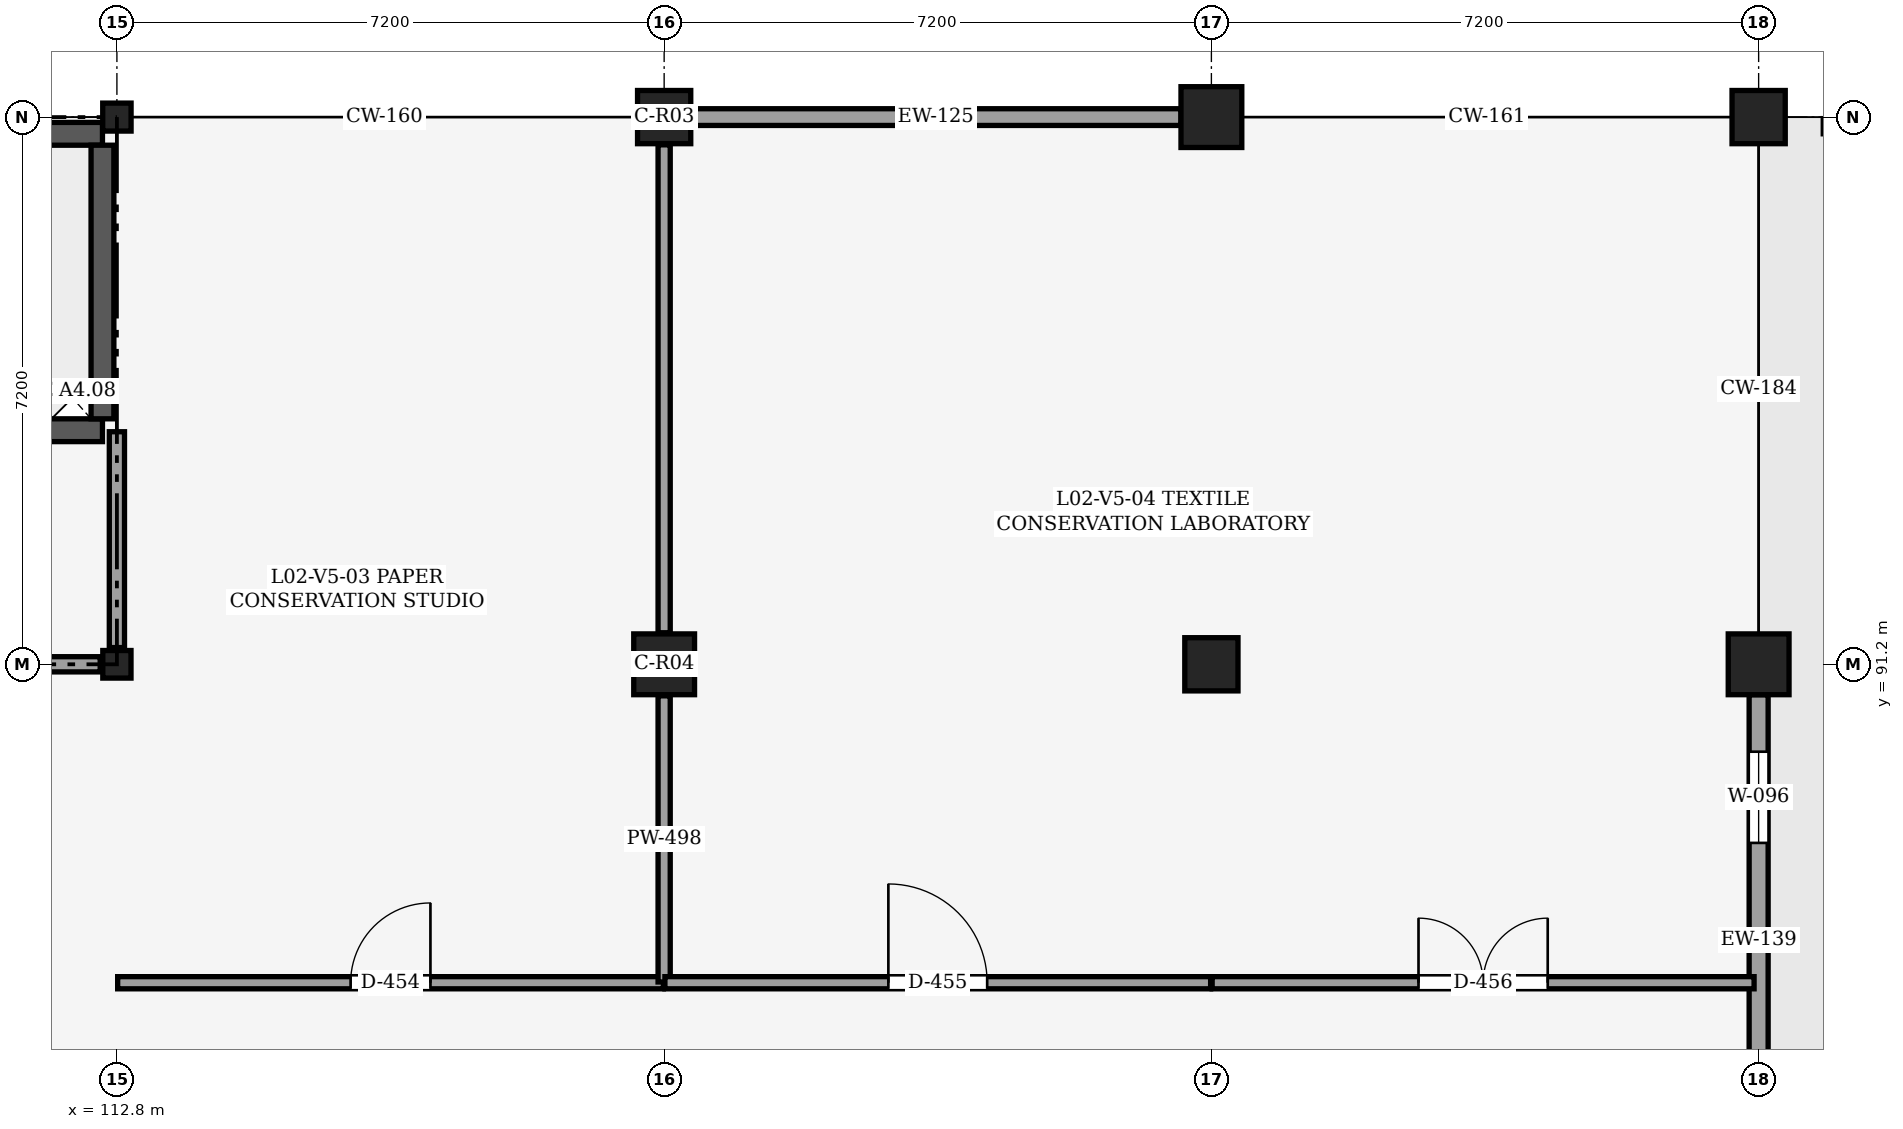
"""IFC4 building model, lengths in metres.
Left out: names, types, materials, properties, quantities, classifications, styles, units other than length and angle.
Written with IfcOpenShell. Run it as: python <this file> out.ifc"""

import sys

from ifc_helpers import new_model, si_unit, direction, frame, frame_2d, origin, origin_2d, place, context, subcontext, project, spatial, rectangle, i_section, extrude, element, fill, save


model = new_model("IFC4")
c1 = context("Model", 3, precision=1e-05, world=origin(), true_north=direction((0.0, 1.0)))
c2 = subcontext(c1, "Body", "Model", "MODEL_VIEW")
j1 = project(units=[si_unit("LENGTHUNIT", "METRE"), si_unit("PLANEANGLEUNIT", "RADIAN")], contexts=[c1])
p1 = place(None, origin())
s1 = spatial("IfcSite", under=j1, at=p1, CompositionType="ELEMENT")
p2 = place(p1, origin())
s2 = spatial("IfcBuilding", under=s1, at=p2, CompositionType="ELEMENT")
p3 = place(p2, frame((0.0, 0.0, 10.2)))
s3 = spatial("IfcBuildingStorey", under=s2, at=p3, CompositionType="ELEMENT", Elevation=10.2)
p4 = place(p3, frame((112.8, 91.2, 0.0), z_axis=(0.0, 0.0, 1.0), x_axis=(1.0, 0.0, 0.0)))
e1 = element("IfcColumn", 1, at=p4, inside=s3, PredefinedType="COLUMN", context=c2, shape_type="SweptSolid", body=[
    extrude(i_section(OverallWidth=0.371, OverallDepth=0.363, WebThickness=0.013, FlangeThickness=0.022, FilletRadius=0.025, at=origin_2d()), origin(), (0.0, 0.0, 1.0), 4.8),
])
p5 = place(p3, frame((112.8, 98.4, 0.0), z_axis=(0.0, 0.0, 1.0), x_axis=(1.0, 0.0, 0.0)))
e2 = element("IfcColumn", 2, at=p5, inside=s3, PredefinedType="COLUMN", context=c2, shape_type="SweptSolid", body=[
    extrude(i_section(OverallWidth=0.373, OverallDepth=0.368, WebThickness=0.015, FlangeThickness=0.024, FilletRadius=0.025, at=origin_2d()), origin(), (0.0, 0.0, 1.0), 4.8),
])
p6 = place(p3, frame((120.0, 91.2, 0.0), z_axis=(0.0, 0.0, 1.0), x_axis=(1.0, 0.0, 0.0)))
e3 = element("IfcColumn", 3, at=p6, inside=s3, PredefinedType="COLUMN", context=c2, shape_type="SweptSolid", body=[
    extrude(rectangle(XDim=0.8, YDim=0.8, at=origin_2d()), origin(), (0.0, 0.0, 1.0), 4.8),
])
for number, where, z_axis, x_axis in (
    (4, (120.0, 98.4, 0.0), (0.0, 0.0, 1.0), (1.0, 0.0, 0.0)),
    (5, (127.2, 91.2, 0.0), (0.0, 0.0, 1.0), (1.0, 0.0, 0.0)),
):
    element("IfcColumn", number, at=place(p3, frame(where, z_axis=z_axis, x_axis=x_axis)), inside=s3, PredefinedType="COLUMN", context=c2, shape_type="SweptSolid", body=[
        extrude(rectangle(XDim=0.7, YDim=0.7, at=origin_2d()), origin(), (0.0, 0.0, 1.0), 4.8),
    ])
for number, where, z_axis, x_axis in (
    (6, (127.2, 98.4, 0.0), (0.0, 0.0, 1.0), (1.0, 0.0, 0.0)),
    (7, (134.4, 91.2, 0.0), (0.0, 0.0, 1.0), (1.0, 0.0, 0.0)),
):
    element("IfcColumn", number, at=place(p3, frame(where, z_axis=z_axis, x_axis=x_axis)), inside=s3, PredefinedType="COLUMN", context=c2, shape_type="SweptSolid", body=[
        extrude(rectangle(XDim=0.8, YDim=0.8, at=origin_2d()), origin(), (0.0, 0.0, 1.0), 4.8),
    ])
p7 = place(p3, frame((134.4, 98.4, 0.0), z_axis=(0.0, 0.0, 1.0), x_axis=(1.0, 0.0, 0.0)))
e8 = element("IfcColumn", 8, at=p7, inside=s3, PredefinedType="COLUMN", context=c2, shape_type="SweptSolid", body=[
    extrude(rectangle(XDim=0.7, YDim=0.7, at=origin_2d()), origin(), (0.0, 0.0, 1.0), 4.8),
])
p8 = place(p3, frame((120.35, 98.4, 0.0), z_axis=(0.0, 0.0, 1.0), x_axis=(1.0, 0.0, 0.0)))
e9 = element("IfcWall", 9, at=p8, inside=s3, PredefinedType="SOLIDWALL", context=c2, shape_type="SweptSolid", body=[
    extrude(rectangle(XDim=6.45, YDim=0.22, at=frame_2d((3.225, 0.0))), origin(), (0.0, 0.0, 1.0), 3.933),
])
p9 = place(p3, frame((134.4, 90.8, 0.0), z_axis=(0.0, 0.0, 1.0), x_axis=(0.0, -1.0, 0.0)))
e10 = element("IfcWall", 10, at=p9, inside=s3, PredefinedType="SOLIDWALL", context=c2, shape_type="SweptSolid", body=[
    extrude(rectangle(XDim=6.45, YDim=0.25, at=frame_2d((3.225, 0.0))), origin(), (0.0, 0.0, 1.0), 3.928),
])
p10 = place(p9, frame((0.75, 0.0, 0.9)))
e11 = element("IfcOpeningElement", 11, at=p10, cuts=e10, PredefinedType="OPENING", context=c2, shape_type="SweptSolid", body=[
    extrude(rectangle(XDim=1.2, YDim=1.5, at=frame_2d((0.6, 0.75))), frame((0.0, 0.135, 0.0), z_axis=(0.0, -1.0, 0.0), x_axis=(1.0, 0.0, 0.0)), (0.0, 0.0, 1.0), 0.271),
])
p11 = place(p3, frame((104.59, 94.28, 0.0), z_axis=(0.0, 0.0, 1.0), x_axis=(1.0, 0.0, 0.0)))
e12 = element("IfcWall", 12, at=p11, inside=s3, PredefinedType="SHEAR", context=c2, shape_type="SweptSolid", body=[
    extrude(rectangle(XDim=8.02, YDim=0.3, at=frame_2d((4.01, 0.0))), origin(), (0.0, 0.0, 1.0), 4.56),
])
p12 = place(p11, frame((0.45, 0.0, 0.0)))
e13 = element("IfcOpeningElement", 13, at=p12, cuts=e12, PredefinedType="OPENING", context=c2, shape_type="SweptSolid", body=[
    extrude(rectangle(XDim=1.1, YDim=2.15, at=frame_2d((0.55, 1.075))), frame((0.0, 0.16, 0.0), z_axis=(0.0, -1.0, 0.0), x_axis=(1.0, 0.0, 0.0)), (0.0, 0.0, 1.0), 0.321),
])
p13 = place(p3, frame((104.59, 98.18, 0.0), z_axis=(0.0, 0.0, 1.0), x_axis=(1.0, 0.0, 0.0)))
e14 = element("IfcWall", 14, at=p13, inside=s3, PredefinedType="SHEAR", context=c2, shape_type="SweptSolid", body=[
    extrude(rectangle(XDim=8.02, YDim=0.3, at=frame_2d((4.01, 0.0))), origin(), (0.0, 0.0, 1.0), 4.56),
])
p14 = place(p3, frame((112.61, 94.43, 0.0), z_axis=(0.0, 0.0, 1.0), x_axis=(0.0, 1.0, 0.0)))
e15 = element("IfcWall", 15, at=p14, inside=s3, PredefinedType="SHEAR", context=c2, shape_type="SweptSolid", body=[
    extrude(rectangle(XDim=3.6, YDim=0.3, at=frame_2d((1.8, 0.0))), origin(), (0.0, 0.0, 1.0), 4.56),
])
p15 = place(p3, frame((112.8, 91.42, 0.0), z_axis=(0.0, 0.0, 1.0), x_axis=(0.0, 1.0, 0.0)))
e16 = element("IfcWall", 16, at=p15, inside=s3, PredefinedType="PARTITIONING", context=c2, shape_type="SweptSolid", body=[
    extrude(rectangle(XDim=2.84, YDim=0.2, at=frame_2d((1.42, 0.0))), origin(), (0.0, 0.0, 1.0), 4.007),
])
p16 = place(p3, frame((104.62, 91.2, 0.0), z_axis=(0.0, 0.0, 1.0), x_axis=(1.0, 0.0, 0.0)))
e17 = element("IfcWall", 17, at=p16, inside=s3, PredefinedType="PARTITIONING", context=c2, shape_type="SweptSolid", body=[
    extrude(rectangle(XDim=7.96, YDim=0.2, at=frame_2d((3.98, 0.0))), origin(), (0.0, 0.0, 1.0), 3.918),
])
p17 = place(p16, frame((3.255, 0.0, 0.0)))
e18 = element("IfcOpeningElement", 18, at=p17, cuts=e17, PredefinedType="OPENING", context=c2, shape_type="SweptSolid", body=[
    extrude(rectangle(XDim=1.45, YDim=2.2, at=frame_2d((0.725, 1.1))), frame((0.0, 0.11, 0.0), z_axis=(0.0, -1.0, 0.0), x_axis=(1.0, 0.0, 0.0)), (0.0, 0.0, 1.0), 0.22),
])
p18 = place(p3, frame((112.81, 87.01, 0.0), z_axis=(0.0, 0.0, 1.0), x_axis=(1.0, 0.0, 0.0)))
e19 = element("IfcWall", 19, at=p18, inside=s3, PredefinedType="PARTITIONING", context=c2, shape_type="SweptSolid", body=[
    extrude(rectangle(XDim=7.18, YDim=0.16, at=frame_2d((3.59, 0.0))), origin(), (0.0, 0.0, 1.0), 4.54),
])
p19 = place(p18, frame((3.065, 0.0, 0.0)))
e20 = element("IfcOpeningElement", 20, at=p19, cuts=e19, PredefinedType="OPENING", context=c2, shape_type="SweptSolid", body=[
    extrude(rectangle(XDim=1.05, YDim=2.15, at=frame_2d((0.525, 1.075))), frame((0.0, 0.09, 0.0), z_axis=(0.0, -1.0, 0.0), x_axis=(1.0, 0.0, 0.0)), (0.0, 0.0, 1.0), 0.18),
])
p20 = place(p3, frame((120.0, 87.02, 0.0), z_axis=(0.0, 0.0, 1.0), x_axis=(0.0, 1.0, 0.0)))
e21 = element("IfcWall", 21, at=p20, inside=s3, PredefinedType="PARTITIONING", context=c2, shape_type="SweptSolid", body=[
    extrude(rectangle(XDim=3.765, YDim=0.16, at=frame_2d((1.882, 0.0))), origin(), (0.0, 0.0, 1.0), 4.007),
])
p21 = place(p3, frame((120.0, 91.615, 0.0), z_axis=(0.0, 0.0, 1.0), x_axis=(0.0, 1.0, 0.0)))
e22 = element("IfcWall", 22, at=p21, inside=s3, PredefinedType="PARTITIONING", context=c2, shape_type="SweptSolid", body=[
    extrude(rectangle(XDim=6.42, YDim=0.16, at=frame_2d((3.21, 0.0))), origin(), (0.0, 0.0, 1.0), 4.078),
])
p22 = place(p3, frame((120.01, 87.01, 0.0), z_axis=(0.0, 0.0, 1.0), x_axis=(1.0, 0.0, 0.0)))
e23 = element("IfcWall", 23, at=p22, inside=s3, PredefinedType="PARTITIONING", context=c2, shape_type="SweptSolid", body=[
    extrude(rectangle(XDim=7.18, YDim=0.16, at=frame_2d((3.59, 0.0))), origin(), (0.0, 0.0, 1.0), 4.54),
])
p23 = place(p22, frame((2.94, 0.0, 0.0)))
e24 = element("IfcOpeningElement", 24, at=p23, cuts=e23, PredefinedType="OPENING", context=c2, shape_type="SweptSolid", body=[
    extrude(rectangle(XDim=1.3, YDim=2.2, at=frame_2d((0.65, 1.1))), frame((0.0, 0.09, 0.0), z_axis=(0.0, -1.0, 0.0), x_axis=(1.0, 0.0, 0.0)), (0.0, 0.0, 1.0), 0.18),
])
p24 = place(p3, frame((127.21, 87.01, 0.0), z_axis=(0.0, 0.0, 1.0), x_axis=(1.0, 0.0, 0.0)))
e25 = element("IfcWall", 25, at=p24, inside=s3, PredefinedType="PARTITIONING", context=c2, shape_type="SweptSolid", body=[
    extrude(rectangle(XDim=7.13, YDim=0.16, at=frame_2d((3.565, 0.0))), origin(), (0.0, 0.0, 1.0), 4.54),
])
p25 = place(p24, frame((2.715, 0.0, 0.0)))
e26 = element("IfcOpeningElement", 26, at=p25, cuts=e25, PredefinedType="OPENING", context=c2, shape_type="SweptSolid", body=[
    extrude(rectangle(XDim=1.7, YDim=2.4, at=frame_2d((0.85, 1.2))), frame((0.0, 0.09, 0.0), z_axis=(0.0, -1.0, 0.0), x_axis=(1.0, 0.0, 0.0)), (0.0, 0.0, 1.0), 0.18),
])
p26 = place(p10, origin())
e27 = element("IfcWindow", 27, at=p26, inside=s3, PartitioningType="SINGLE_PANEL", PredefinedType="WINDOW", context=c2, shape_type="SweptSolid", body=[
    extrude(rectangle(XDim=1.2, YDim=1.5, at=frame_2d((0.6, 0.75))), frame((0.0, 0.03, 0.0), z_axis=(0.0, -1.0, 0.0), x_axis=(1.0, 0.0, 0.0)), (0.0, 0.0, 1.0), 0.06),
])
fill(e11, e27)
p27 = place(p19, origin())
e28 = element("IfcDoor", 28, at=p27, inside=s3, OperationType="SINGLE_SWING_RIGHT", PredefinedType="DOOR", context=c2, shape_type="SweptSolid", body=[
    extrude(rectangle(XDim=1.05, YDim=2.15, at=frame_2d((0.525, 1.075))), frame((0.0, 0.025, 0.0), z_axis=(0.0, -1.0, 0.0), x_axis=(1.0, 0.0, 0.0)), (0.0, 0.0, 1.0), 0.05),
])
fill(e20, e28)
p28 = place(p23, origin())
e29 = element("IfcDoor", 29, at=p28, inside=s3, OperationType="SINGLE_SWING_LEFT", PredefinedType="DOOR", context=c2, shape_type="SweptSolid", body=[
    extrude(rectangle(XDim=1.3, YDim=2.2, at=frame_2d((0.65, 1.1))), frame((0.0, 0.025, 0.0), z_axis=(0.0, -1.0, 0.0), x_axis=(1.0, 0.0, 0.0)), (0.0, 0.0, 1.0), 0.05),
])
fill(e24, e29)
p29 = place(p25, origin())
e30 = element("IfcDoor", 30, at=p29, inside=s3, OperationType="DOUBLE_DOOR_SINGLE_SWING", PredefinedType="DOOR", context=c2, shape_type="SweptSolid", body=[
    extrude(rectangle(XDim=1.7, YDim=2.4, at=frame_2d((0.85, 1.2))), frame((0.0, 0.025, 0.0), z_axis=(0.0, -1.0, 0.0), x_axis=(1.0, 0.0, 0.0)), (0.0, 0.0, 1.0), 0.05),
])
fill(e26, e30)
save(model, sys.argv[1])
